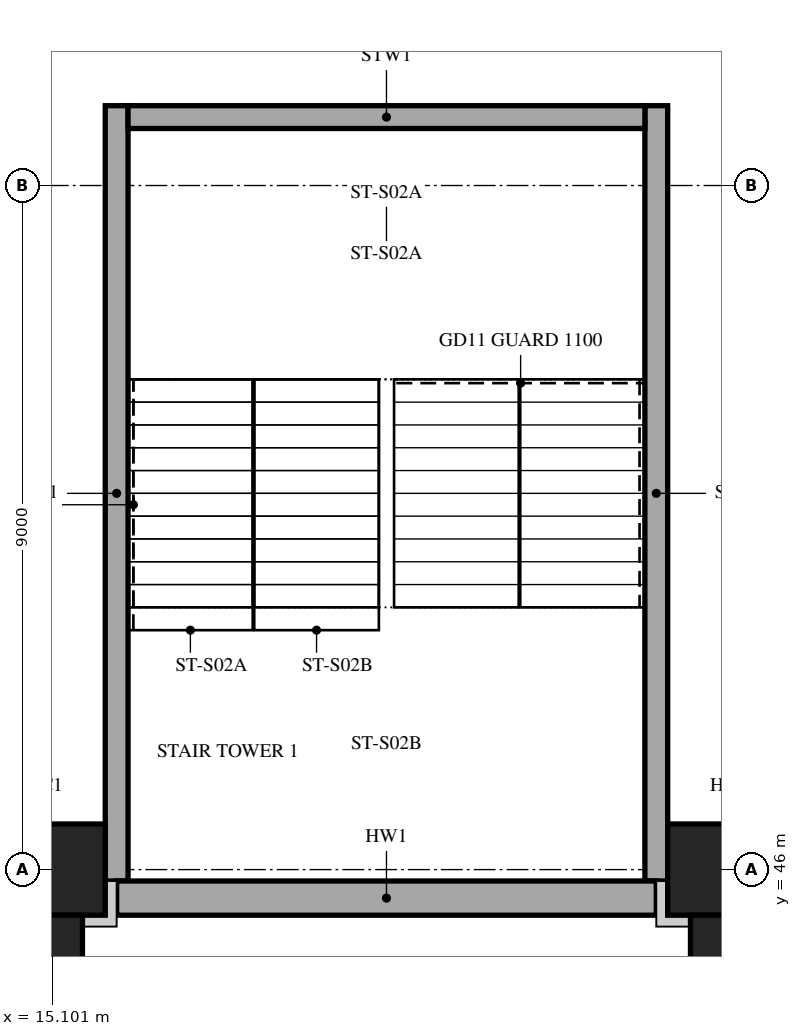
"""IFC4 building model, lengths in metres.
Left out: names, types, materials, properties, quantities, classifications, styles, units other than length and angle.
Written with IfcOpenShell. Run it as: python <this file> out.ifc"""

import sys

from ifc_helpers import new_model, si_unit, direction, frame, frame_2d, origin, origin_2d, place, context, subcontext, project, spatial, rectangle, extrude, element, save


model = new_model("IFC4")
c1 = context("Model", 3, precision=1e-05, world=origin(), true_north=direction((0.0, 1.0)))
c2 = subcontext(c1, "Body", "Model", "MODEL_VIEW")
j1 = project(units=[si_unit("LENGTHUNIT", "METRE"), si_unit("PLANEANGLEUNIT", "RADIAN")], contexts=[c1])
p1 = place(None, origin())
s1 = spatial("IfcSite", under=j1, at=p1, CompositionType="ELEMENT")
p2 = place(p1, origin())
s2 = spatial("IfcBuilding", under=s1, at=p2, CompositionType="ELEMENT")
p3 = place(p2, frame((0.0, 0.0, 10.0)))
s3 = spatial("IfcBuildingStorey", under=s2, at=p3, CompositionType="ELEMENT", Elevation=10.0)
for number, where, z_axis, x_axis in (
    (1, (15.0, 46.0, 0.0), (0.0, 0.0, 1.0), (1.0, 0.0, 0.0)),
    (2, (24.0, 46.0, 0.0), (0.0, 0.0, 1.0), (1.0, 0.0, 0.0)),
):
    element("IfcColumn", number, at=place(p3, frame(where, z_axis=z_axis, x_axis=x_axis)), inside=s3, PredefinedType="COLUMN", context=c2, shape_type="SweptSolid", body=[
        extrude(rectangle(XDim=1.6, YDim=1.2, at=origin_2d()), origin(), (0.0, 0.0, 1.0), 5.0),
    ])
for number, where, z_axis, x_axis in (
    (3, (15.95, 45.85, 0.0), (0.0, 0.0, 1.0), (0.0, 1.0, 0.0)),
    (4, (23.05, 45.85, 0.0), (0.0, 0.0, 1.0), (0.0, 1.0, 0.0)),
):
    element("IfcWall", number, at=place(p3, frame(where, z_axis=z_axis, x_axis=x_axis)), inside=s3, PredefinedType="SHEAR", context=c2, shape_type="SweptSolid", body=[
        extrude(rectangle(XDim=10.2, YDim=0.3, at=frame_2d((5.1, 0.0))), origin(), (0.0, 0.0, 1.0), 5.0),
    ])
p4 = place(p3, frame((16.1, 55.9, 0.0), z_axis=(0.0, 0.0, 1.0), x_axis=(1.0, 0.0, 0.0)))
e5 = element("IfcWall", 5, at=p4, inside=s3, PredefinedType="SHEAR", context=c2, shape_type="SweptSolid", body=[
    extrude(rectangle(XDim=6.8, YDim=0.3, at=frame_2d((3.4, 0.0))), origin(), (0.0, 0.0, 1.0), 5.0),
])
for number, where, z_axis, x_axis in (
    (6, (15.0, 44.9, 0.0), (0.0, 0.0, 1.0), (1.0, 0.0, 0.0)),
    (7, (24.0, 44.9, 0.0), (0.0, 0.0, 1.0), (1.0, 0.0, 0.0)),
):
    element("IfcColumn", number, at=place(p3, frame(where, z_axis=z_axis, x_axis=x_axis)), inside=s3, PredefinedType="COLUMN", context=c2, shape_type="SweptSolid", body=[
        extrude(rectangle(XDim=1.0, YDim=1.0, at=origin_2d()), origin(), (0.0, 0.0, 1.0), 3.4),
    ])
p5 = place(p3, frame((15.95, 45.625, 0.0), z_axis=(0.0, 0.0, 1.0), x_axis=(1.0, 0.0, 0.0)))
e8 = element("IfcWall", 8, at=p5, inside=s3, PredefinedType="SOLIDWALL", context=c2, shape_type="SweptSolid", body=[
    extrude(rectangle(XDim=7.1, YDim=0.45, at=frame_2d((3.55, 0.0))), origin(), (0.0, 0.0, 1.0), 5.0),
])
save(model, sys.argv[1])
